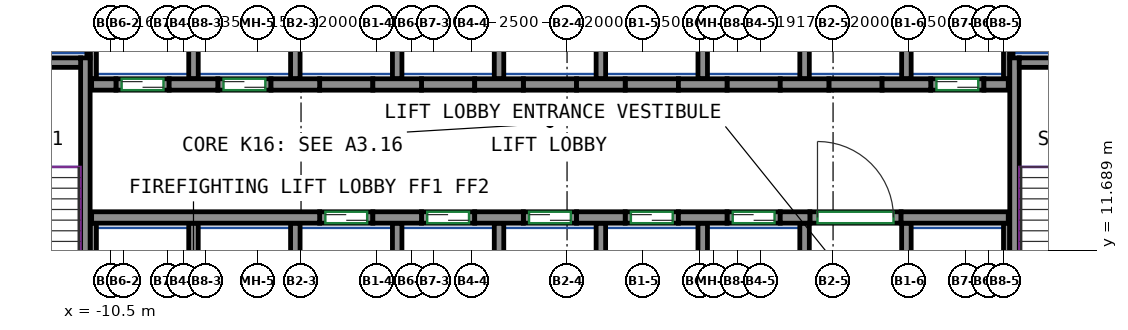
"""IFC4 building model, lengths in metres.
Left out: names, types, materials, properties, quantities, classifications, styles, units other than length and angle.
Written with IfcOpenShell. Run it as: python <this file> out.ifc"""

import sys

from ifc_helpers import new_model, si_unit, direction, frame, frame_2d, origin, place, context, subcontext, project, spatial, rectangle, extrude, source, transform, mapped, element, fill, save


model = new_model("IFC4")
c1 = context("Model", 3, precision=1e-05, world=origin(), true_north=direction((0.0, 1.0)))
c2 = subcontext(c1, "Body", "Model", "MODEL_VIEW")
j1 = project(units=[si_unit("LENGTHUNIT", "METRE"), si_unit("PLANEANGLEUNIT", "RADIAN")], contexts=[c1])
p1 = place(None, origin())
s1 = spatial("IfcSite", under=j1, at=p1, CompositionType="ELEMENT")
p2 = place(p1, origin())
s2 = spatial("IfcBuilding", under=s1, at=p2, CompositionType="ELEMENT")
p3 = place(p2, frame((0.0, 0.0, 67.2)))
s3 = spatial("IfcBuildingStorey", under=s2, at=p3, CompositionType="ELEMENT", Elevation=67.2)
m1 = source(origin(), c2, "Body", "SweptSolid", [
    extrude(rectangle(XDim=7.75, YDim=0.25, at=frame_2d((3.875, 0.0))), origin(), (0.0, 0.0, 1.0), 3.72),
])
p4 = place(p3, frame((-11.175, 9.0, 0.0), z_axis=(0.0, 0.0, 1.0), x_axis=(0.0, 1.0, 0.0)))
e1 = element("IfcWall", 1, at=p4, inside=s3, PredefinedType="SHEAR", context=c2, shape_type="MappedRepresentation", body=[
    mapped(m1, transform((0.0, 0.0, 0.0))),
])
m2 = source(origin(), c2, "Body", "SweptSolid", [
    extrude(rectangle(XDim=3.7, YDim=0.25, at=frame_2d((1.85, 0.0))), origin(), (0.0, 0.0, 1.0), 3.72),
])
p5 = place(p3, frame((-15.0, 16.625, 0.0), z_axis=(0.0, 0.0, 1.0), x_axis=(1.0, 0.0, 0.0)))
e2 = element("IfcWall", 2, at=p5, inside=s3, PredefinedType="SHEAR", context=c2, shape_type="MappedRepresentation", body=[
    mapped(m2, transform((0.0, 0.0, 0.0))),
])
p6 = place(p3, frame((13.275, 9.0, 0.0), z_axis=(0.0, 0.0, 1.0), x_axis=(0.0, 1.0, 0.0)))
e3 = element("IfcWall", 3, at=p6, inside=s3, PredefinedType="SHEAR", context=c2, shape_type="MappedRepresentation", body=[
    mapped(m1, transform((0.0, 0.0, 0.0))),
])
m3 = source(origin(), c2, "Body", "SweptSolid", [
    extrude(rectangle(XDim=3.7, YDim=0.25, at=frame_2d((1.85, 0.0))), origin(), (0.0, 0.0, 1.0), 3.72),
])
p7 = place(p3, frame((13.4, 16.625, 0.0), z_axis=(0.0, 0.0, 1.0), x_axis=(1.0, 0.0, 0.0)))
e4 = element("IfcWall", 4, at=p7, inside=s3, PredefinedType="SHEAR", context=c2, shape_type="MappedRepresentation", body=[
    mapped(m3, transform((0.0, 0.0, 0.0))),
])
m4 = source(origin(), c2, "Body", "SweptSolid", [
    extrude(rectangle(XDim=6.0, YDim=0.3, at=frame_2d((3.0, 0.0))), origin(), (0.0, 0.0, 1.0), 3.72),
])
p8 = place(p3, frame((-11.01, 12.55, 0.0), z_axis=(0.0, 0.0, 1.0), x_axis=(1.0, 0.0, 0.0)))
e5 = element("IfcWall", 5, at=p8, inside=s3, PredefinedType="SHEAR", context=c2, shape_type="MappedRepresentation", body=[
    mapped(m4, transform((0.0, 0.0, 0.0))),
])
m5 = source(origin(), c2, "Body", "SweptSolid", [
    extrude(rectangle(XDim=1.28, YDim=0.3, at=frame_2d((0.64, 0.0))), origin(), (0.0, 0.0, 1.0), 3.72),
])
for number, where, z_axis, x_axis in (
    (6, (-3.61, 12.55, 0.0), (0.0, 0.0, 1.0), (1.0, 0.0, 0.0)),
    (7, (-0.93, 12.55, 0.0), (0.0, 0.0, 1.0), (1.0, 0.0, 0.0)),
    (8, (1.75, 12.55, 0.0), (0.0, 0.0, 1.0), (1.0, 0.0, 0.0)),
    (9, (4.43, 12.55, 0.0), (0.0, 0.0, 1.0), (1.0, 0.0, 0.0)),
):
    element("IfcWall", number, at=place(p3, frame(where, z_axis=z_axis, x_axis=x_axis)), inside=s3, PredefinedType="SHEAR", context=c2, shape_type="MappedRepresentation", body=[
        mapped(m5, transform((0.0, 0.0, 0.0))),
    ])
m6 = source(origin(), c2, "Body", "SweptSolid", [
    extrude(rectangle(XDim=0.78, YDim=0.3, at=frame_2d((0.39, 0.0))), origin(), (0.0, 0.0, 1.0), 3.72),
])
p9 = place(p3, frame((7.11, 12.55, 0.0), z_axis=(0.0, 0.0, 1.0), x_axis=(1.0, 0.0, 0.0)))
e10 = element("IfcWall", 10, at=p9, inside=s3, PredefinedType="SHEAR", context=c2, shape_type="MappedRepresentation", body=[
    mapped(m6, transform((0.0, 0.0, 0.0))),
])
m7 = source(origin(), c2, "Body", "SweptSolid", [
    extrude(rectangle(XDim=2.82, YDim=0.3, at=frame_2d((1.41, 0.0))), origin(), (0.0, 0.0, 1.0), 3.72),
])
p10 = place(p3, frame((10.29, 12.55, 0.0), z_axis=(0.0, 0.0, 1.0), x_axis=(1.0, 0.0, 0.0)))
e11 = element("IfcWall", 11, at=p10, inside=s3, PredefinedType="SHEAR", context=c2, shape_type="MappedRepresentation", body=[
    mapped(m7, transform((0.0, 0.0, 0.0))),
])
m8 = source(origin(), c2, "Body", "SweptSolid", [
    extrude(rectangle(XDim=0.64, YDim=0.3, at=frame_2d((0.32, 0.0))), origin(), (0.0, 0.0, 1.0), 3.72),
])
p11 = place(p3, frame((-11.01, 16.05, 0.0), z_axis=(0.0, 0.0, 1.0), x_axis=(1.0, 0.0, 0.0)))
e12 = element("IfcWall", 12, at=p11, inside=s3, PredefinedType="SHEAR", context=c2, shape_type="MappedRepresentation", body=[
    mapped(m8, transform((0.0, 0.0, 0.0))),
])
for number, where, z_axis, x_axis in (
    (13, (-8.97, 16.05, 0.0), (0.0, 0.0, 1.0), (1.0, 0.0, 0.0)),
    (14, (-6.29, 16.05, 0.0), (0.0, 0.0, 1.0), (1.0, 0.0, 0.0)),
    (15, (-3.61, 16.05, 0.0), (0.0, 0.0, 1.0), (1.0, 0.0, 0.0)),
    (16, (-0.93, 16.05, 0.0), (0.0, 0.0, 1.0), (1.0, 0.0, 0.0)),
    (17, (1.75, 16.05, 0.0), (0.0, 0.0, 1.0), (1.0, 0.0, 0.0)),
    (18, (4.43, 16.05, 0.0), (0.0, 0.0, 1.0), (1.0, 0.0, 0.0)),
):
    element("IfcWall", number, at=place(p3, frame(where, z_axis=z_axis, x_axis=x_axis)), inside=s3, PredefinedType="SHEAR", context=c2, shape_type="MappedRepresentation", body=[
        mapped(m5, transform((0.0, 0.0, 0.0))),
    ])
m9 = source(origin(), c2, "Body", "SweptSolid", [
    extrude(rectangle(XDim=1.28, YDim=0.3, at=frame_2d((0.64, 0.0))), origin(), (0.0, 0.0, 1.0), 3.72),
])
p12 = place(p3, frame((7.11, 16.05, 0.0), z_axis=(0.0, 0.0, 1.0), x_axis=(1.0, 0.0, 0.0)))
e19 = element("IfcWall", 19, at=p12, inside=s3, PredefinedType="SHEAR", context=c2, shape_type="MappedRepresentation", body=[
    mapped(m9, transform((0.0, 0.0, 0.0))),
])
p13 = place(p3, frame((9.79, 16.05, 0.0), z_axis=(0.0, 0.0, 1.0), x_axis=(1.0, 0.0, 0.0)))
e20 = element("IfcWall", 20, at=p13, inside=s3, PredefinedType="SHEAR", context=c2, shape_type="MappedRepresentation", body=[
    mapped(m5, transform((0.0, 0.0, 0.0))),
])
m10 = source(origin(), c2, "Body", "SweptSolid", [
    extrude(rectangle(XDim=0.64, YDim=0.3, at=frame_2d((0.32, 0.0))), origin(), (0.0, 0.0, 1.0), 3.72),
])
p14 = place(p3, frame((12.47, 16.05, 0.0), z_axis=(0.0, 0.0, 1.0), x_axis=(1.0, 0.0, 0.0)))
e21 = element("IfcWall", 21, at=p14, inside=s3, PredefinedType="SHEAR", context=c2, shape_type="MappedRepresentation", body=[
    mapped(m10, transform((0.0, 0.0, 0.0))),
])
m11 = source(origin(), c2, "Body", "SweptSolid", [
    extrude(rectangle(XDim=1.4, YDim=0.3, at=frame_2d((0.7, 0.0))), origin(), (0.0, 0.0, 1.0), 3.72),
])
p15 = place(p3, frame((-5.01, 12.55, 0.0), z_axis=(0.0, 0.0, 1.0), x_axis=(1.0, 0.0, 0.0)))
e22 = element("IfcWall", 22, at=p15, inside=s3, PredefinedType="PARTITIONING", context=c2, shape_type="MappedRepresentation", body=[
    mapped(m11, transform((0.0, 0.0, 0.0))),
])
p16 = place(p15, frame((0.15, 0.0, 0.0)))
e23 = element("IfcOpeningElement", 23, at=p16, cuts=e22, PredefinedType="OPENING", context=c2, shape_type="SweptSolid", body=[
    extrude(rectangle(XDim=1.1, YDim=2.1, at=frame_2d((0.55, 1.05))), frame((0.0, 0.16, 0.0), z_axis=(0.0, -1.0, 0.0), x_axis=(1.0, 0.0, 0.0)), (0.0, 0.0, 1.0), 0.32),
])
m12 = source(origin(), c2, "Body", "SweptSolid", [
    extrude(rectangle(XDim=1.4, YDim=0.3, at=frame_2d((0.7, 0.0))), origin(), (0.0, 0.0, 1.0), 3.72),
])
p17 = place(p3, frame((-2.33, 12.55, 0.0), z_axis=(0.0, 0.0, 1.0), x_axis=(1.0, 0.0, 0.0)))
e24 = element("IfcWall", 24, at=p17, inside=s3, PredefinedType="PARTITIONING", context=c2, shape_type="MappedRepresentation", body=[
    mapped(m12, transform((0.0, 0.0, 0.0))),
])
p18 = place(p17, frame((0.15, 0.0, 0.0)))
e25 = element("IfcOpeningElement", 25, at=p18, cuts=e24, PredefinedType="OPENING", context=c2, shape_type="SweptSolid", body=[
    extrude(rectangle(XDim=1.1, YDim=2.1, at=frame_2d((0.55, 1.05))), frame((0.0, 0.16, 0.0), z_axis=(0.0, -1.0, 0.0), x_axis=(1.0, 0.0, 0.0)), (0.0, 0.0, 1.0), 0.32),
])
p19 = place(p3, frame((0.35, 12.55, 0.0), z_axis=(0.0, 0.0, 1.0), x_axis=(1.0, 0.0, 0.0)))
e26 = element("IfcWall", 26, at=p19, inside=s3, PredefinedType="PARTITIONING", context=c2, shape_type="MappedRepresentation", body=[
    mapped(m11, transform((0.0, 0.0, 0.0))),
])
p20 = place(p19, frame((0.15, 0.0, 0.0)))
e27 = element("IfcOpeningElement", 27, at=p20, cuts=e26, PredefinedType="OPENING", context=c2, shape_type="SweptSolid", body=[
    extrude(rectangle(XDim=1.1, YDim=2.1, at=frame_2d((0.55, 1.05))), frame((0.0, 0.16, 0.0), z_axis=(0.0, -1.0, 0.0), x_axis=(1.0, 0.0, 0.0)), (0.0, 0.0, 1.0), 0.32),
])
p21 = place(p3, frame((3.03, 12.55, 0.0), z_axis=(0.0, 0.0, 1.0), x_axis=(1.0, 0.0, 0.0)))
e28 = element("IfcWall", 28, at=p21, inside=s3, PredefinedType="PARTITIONING", context=c2, shape_type="MappedRepresentation", body=[
    mapped(m11, transform((0.0, 0.0, 0.0))),
])
p22 = place(p21, frame((0.15, 0.0, 0.0)))
e29 = element("IfcOpeningElement", 29, at=p22, cuts=e28, PredefinedType="OPENING", context=c2, shape_type="SweptSolid", body=[
    extrude(rectangle(XDim=1.1, YDim=2.1, at=frame_2d((0.55, 1.05))), frame((0.0, 0.16, 0.0), z_axis=(0.0, -1.0, 0.0), x_axis=(1.0, 0.0, 0.0)), (0.0, 0.0, 1.0), 0.32),
])
p23 = place(p3, frame((5.71, 12.55, 0.0), z_axis=(0.0, 0.0, 1.0), x_axis=(1.0, 0.0, 0.0)))
e30 = element("IfcWall", 30, at=p23, inside=s3, PredefinedType="PARTITIONING", context=c2, shape_type="MappedRepresentation", body=[
    mapped(m12, transform((0.0, 0.0, 0.0))),
])
p24 = place(p23, frame((0.15, 0.0, 0.0)))
e31 = element("IfcOpeningElement", 31, at=p24, cuts=e30, PredefinedType="OPENING", context=c2, shape_type="SweptSolid", body=[
    extrude(rectangle(XDim=1.1, YDim=2.1, at=frame_2d((0.55, 1.05))), frame((0.0, 0.16, 0.0), z_axis=(0.0, -1.0, 0.0), x_axis=(1.0, 0.0, 0.0)), (0.0, 0.0, 1.0), 0.32),
])
p25 = place(p3, frame((11.07, 16.05, 0.0), z_axis=(0.0, 0.0, 1.0), x_axis=(1.0, 0.0, 0.0)))
e32 = element("IfcWall", 32, at=p25, inside=s3, PredefinedType="PARTITIONING", context=c2, shape_type="MappedRepresentation", body=[
    mapped(m11, transform((0.0, 0.0, 0.0))),
])
p26 = place(p25, frame((0.15, 0.0, 0.0)))
e33 = element("IfcOpeningElement", 33, at=p26, cuts=e32, PredefinedType="OPENING", context=c2, shape_type="SweptSolid", body=[
    extrude(rectangle(XDim=1.1, YDim=2.1, at=frame_2d((0.55, 1.05))), frame((0.0, 0.16, 0.0), z_axis=(0.0, -1.0, 0.0), x_axis=(1.0, 0.0, 0.0)), (0.0, 0.0, 1.0), 0.32),
])
p27 = place(p3, frame((-10.37, 16.05, 0.0), z_axis=(0.0, 0.0, 1.0), x_axis=(1.0, 0.0, 0.0)))
e34 = element("IfcWall", 34, at=p27, inside=s3, PredefinedType="PARTITIONING", context=c2, shape_type="MappedRepresentation", body=[
    mapped(m12, transform((0.0, 0.0, 0.0))),
])
p28 = place(p27, frame((0.15, 0.0, 0.0)))
e35 = element("IfcOpeningElement", 35, at=p28, cuts=e34, PredefinedType="OPENING", context=c2, shape_type="SweptSolid", body=[
    extrude(rectangle(XDim=1.1, YDim=2.1, at=frame_2d((0.55, 1.05))), frame((0.0, 0.16, 0.0), z_axis=(0.0, -1.0, 0.0), x_axis=(1.0, 0.0, 0.0)), (0.0, 0.0, 1.0), 0.32),
])
p29 = place(p3, frame((-7.69, 16.05, 0.0), z_axis=(0.0, 0.0, 1.0), x_axis=(1.0, 0.0, 0.0)))
e36 = element("IfcWall", 36, at=p29, inside=s3, PredefinedType="PARTITIONING", context=c2, shape_type="MappedRepresentation", body=[
    mapped(m11, transform((0.0, 0.0, 0.0))),
])
p30 = place(p29, frame((0.15, 0.0, 0.0)))
e37 = element("IfcOpeningElement", 37, at=p30, cuts=e36, PredefinedType="OPENING", context=c2, shape_type="SweptSolid", body=[
    extrude(rectangle(XDim=1.1, YDim=2.1, at=frame_2d((0.55, 1.05))), frame((0.0, 0.16, 0.0), z_axis=(0.0, -1.0, 0.0), x_axis=(1.0, 0.0, 0.0)), (0.0, 0.0, 1.0), 0.32),
])
m13 = source(origin(), c2, "Body", "SweptSolid", [
    extrude(rectangle(XDim=2.4, YDim=0.3, at=frame_2d((1.2, 0.0))), origin(), (0.0, 0.0, 1.0), 3.72),
])
p31 = place(p3, frame((7.89, 12.55, 0.0), z_axis=(0.0, 0.0, 1.0), x_axis=(1.0, 0.0, 0.0)))
e38 = element("IfcWall", 38, at=p31, inside=s3, PredefinedType="PARTITIONING", context=c2, shape_type="MappedRepresentation", body=[
    mapped(m13, transform((0.0, 0.0, 0.0))),
])
p32 = place(p31, frame((0.2, 0.0, 0.0)))
e39 = element("IfcOpeningElement", 39, at=p32, cuts=e38, PredefinedType="OPENING", context=c2, shape_type="SweptSolid", body=[
    extrude(rectangle(XDim=2.0, YDim=2.1, at=frame_2d((1.0, 1.05))), frame((0.0, 0.16, 0.0), z_axis=(0.0, -1.0, 0.0), x_axis=(1.0, 0.0, 0.0)), (0.0, 0.0, 1.0), 0.32),
])
p33 = place(p3, frame((-5.01, 16.05, 0.0), z_axis=(0.0, 0.0, 1.0), x_axis=(1.0, 0.0, 0.0)))
e40 = element("IfcWall", 40, at=p33, inside=s3, PredefinedType="PARTITIONING", context=c2, shape_type="MappedRepresentation", body=[
    mapped(m11, transform((0.0, 0.0, 0.0))),
])
p34 = place(p3, frame((-2.33, 16.05, 0.0), z_axis=(0.0, 0.0, 1.0), x_axis=(1.0, 0.0, 0.0)))
e41 = element("IfcWall", 41, at=p34, inside=s3, PredefinedType="PARTITIONING", context=c2, shape_type="MappedRepresentation", body=[
    mapped(m12, transform((0.0, 0.0, 0.0))),
])
for number, where, z_axis, x_axis in (
    (42, (0.35, 16.05, 0.0), (0.0, 0.0, 1.0), (1.0, 0.0, 0.0)),
    (43, (3.03, 16.05, 0.0), (0.0, 0.0, 1.0), (1.0, 0.0, 0.0)),
):
    element("IfcWall", number, at=place(p3, frame(where, z_axis=z_axis, x_axis=x_axis)), inside=s3, PredefinedType="PARTITIONING", context=c2, shape_type="MappedRepresentation", body=[
        mapped(m11, transform((0.0, 0.0, 0.0))),
    ])
for number, where, z_axis, x_axis in (
    (44, (5.71, 16.05, 0.0), (0.0, 0.0, 1.0), (1.0, 0.0, 0.0)),
    (45, (8.39, 16.05, 0.0), (0.0, 0.0, 1.0), (1.0, 0.0, 0.0)),
):
    element("IfcWall", number, at=place(p3, frame(where, z_axis=z_axis, x_axis=x_axis)), inside=s3, PredefinedType="PARTITIONING", context=c2, shape_type="MappedRepresentation", body=[
        mapped(m12, transform((0.0, 0.0, 0.0))),
    ])
m14 = source(origin(), c2, "Body", "SweptSolid", [
    extrude(rectangle(XDim=3.275, YDim=0.165, at=frame_2d((1.638, 0.0))), origin(), (0.0, 0.0, 1.0), 3.72),
])
for number, where, z_axis, x_axis in (
    (46, (13.067, 16.2, 0.0), (0.0, 0.0, 1.0), (0.0, 1.0, 0.0)),
    (47, (-10.968, 16.2, 0.0), (0.0, 0.0, 1.0), (0.0, 1.0, 0.0)),
):
    element("IfcWall", number, at=place(p3, frame(where, z_axis=z_axis, x_axis=x_axis)), inside=s3, PredefinedType="PARTITIONING", context=c2, shape_type="MappedRepresentation", body=[
        mapped(m14, transform((0.0, 0.0, 0.0))),
    ])
m15 = source(origin(), c2, "Body", "SweptSolid", [
    extrude(rectangle(XDim=3.275, YDim=0.25, at=frame_2d((1.638, 0.0))), origin(), (0.0, 0.0, 1.0), 3.72),
])
p35 = place(p3, frame((10.43, 16.2, 0.0), z_axis=(0.0, 0.0, 1.0), x_axis=(0.0, 1.0, 0.0)))
e48 = element("IfcWall", 48, at=p35, inside=s3, PredefinedType="PARTITIONING", context=c2, shape_type="MappedRepresentation", body=[
    mapped(m15, transform((0.0, 0.0, 0.0))),
])
m16 = source(origin(), c2, "Body", "SweptSolid", [
    extrude(rectangle(XDim=2.725, YDim=0.085, at=frame_2d((1.363, 0.0))), origin(), (0.0, 0.0, 1.0), 3.72),
])
p36 = place(p3, frame((13.192, 16.75, 0.0), z_axis=(0.0, 0.0, 1.0), x_axis=(0.0, 1.0, 0.0)))
e49 = element("IfcWall", 49, at=p36, inside=s3, PredefinedType="PARTITIONING", context=c2, shape_type="MappedRepresentation", body=[
    mapped(m16, transform((0.0, 0.0, 0.0))),
])
for number, where, z_axis, x_axis in (
    (50, (2.39, 16.2, 0.0), (0.0, 0.0, 1.0), (0.0, 1.0, 0.0)),
    (51, (5.07, 16.2, 0.0), (0.0, 0.0, 1.0), (0.0, 1.0, 0.0)),
    (52, (7.75, 16.2, 0.0), (0.0, 0.0, 1.0), (0.0, 1.0, 0.0)),
    (53, (-0.29, 16.2, 0.0), (0.0, 0.0, 1.0), (0.0, 1.0, 0.0)),
):
    element("IfcWall", number, at=place(p3, frame(where, z_axis=z_axis, x_axis=x_axis)), inside=s3, PredefinedType="PARTITIONING", context=c2, shape_type="MappedRepresentation", body=[
        mapped(m15, transform((0.0, 0.0, 0.0))),
    ])
p37 = place(p3, frame((-11.093, 16.75, 0.0), z_axis=(0.0, 0.0, 1.0), x_axis=(0.0, 1.0, 0.0)))
e54 = element("IfcWall", 54, at=p37, inside=s3, PredefinedType="PARTITIONING", context=c2, shape_type="MappedRepresentation", body=[
    mapped(m16, transform((0.0, 0.0, 0.0))),
])
for number, where, z_axis, x_axis in (
    (55, (-2.97, 16.2, 0.0), (0.0, 0.0, 1.0), (0.0, 1.0, 0.0)),
    (56, (-5.65, 16.2, 0.0), (0.0, 0.0, 1.0), (0.0, 1.0, 0.0)),
    (57, (-8.33, 16.2, 0.0), (0.0, 0.0, 1.0), (0.0, 1.0, 0.0)),
):
    element("IfcWall", number, at=place(p3, frame(where, z_axis=z_axis, x_axis=x_axis)), inside=s3, PredefinedType="PARTITIONING", context=c2, shape_type="MappedRepresentation", body=[
        mapped(m15, transform((0.0, 0.0, 0.0))),
    ])
m17 = source(origin(), c2, "Body", "SweptSolid", [
    extrude(rectangle(XDim=3.4, YDim=0.25, at=frame_2d((1.7, 0.0))), origin(), (0.0, 0.0, 1.0), 3.72),
])
p38 = place(p3, frame((10.43, 9.0, 0.0), z_axis=(0.0, 0.0, 1.0), x_axis=(0.0, 1.0, 0.0)))
e58 = element("IfcWall", 58, at=p38, inside=s3, PredefinedType="PARTITIONING", context=c2, shape_type="MappedRepresentation", body=[
    mapped(m17, transform((0.0, 0.0, 0.0))),
])
m18 = source(origin(), c2, "Body", "SweptSolid", [
    extrude(rectangle(XDim=3.4, YDim=0.165, at=frame_2d((1.7, 0.0))), origin(), (0.0, 0.0, 1.0), 3.72),
])
p39 = place(p3, frame((13.067, 9.0, 0.0), z_axis=(0.0, 0.0, 1.0), x_axis=(0.0, 1.0, 0.0)))
e59 = element("IfcWall", 59, at=p39, inside=s3, PredefinedType="PARTITIONING", context=c2, shape_type="MappedRepresentation", body=[
    mapped(m18, transform((0.0, 0.0, 0.0))),
])
for number, where, z_axis, x_axis in (
    (60, (2.39, 9.0, 0.0), (0.0, 0.0, 1.0), (0.0, 1.0, 0.0)),
    (61, (5.07, 9.0, 0.0), (0.0, 0.0, 1.0), (0.0, 1.0, 0.0)),
    (62, (7.75, 9.0, 0.0), (0.0, 0.0, 1.0), (0.0, 1.0, 0.0)),
    (63, (-0.29, 9.0, 0.0), (0.0, 0.0, 1.0), (0.0, 1.0, 0.0)),
):
    element("IfcWall", number, at=place(p3, frame(where, z_axis=z_axis, x_axis=x_axis)), inside=s3, PredefinedType="PARTITIONING", context=c2, shape_type="MappedRepresentation", body=[
        mapped(m17, transform((0.0, 0.0, 0.0))),
    ])
p40 = place(p3, frame((-10.968, 9.0, 0.0), z_axis=(0.0, 0.0, 1.0), x_axis=(0.0, 1.0, 0.0)))
e64 = element("IfcWall", 64, at=p40, inside=s3, PredefinedType="PARTITIONING", context=c2, shape_type="MappedRepresentation", body=[
    mapped(m18, transform((0.0, 0.0, 0.0))),
])
for number, where, z_axis, x_axis in (
    (65, (-2.97, 9.0, 0.0), (0.0, 0.0, 1.0), (0.0, 1.0, 0.0)),
    (66, (-5.65, 9.0, 0.0), (0.0, 0.0, 1.0), (0.0, 1.0, 0.0)),
    (67, (-8.33, 9.0, 0.0), (0.0, 0.0, 1.0), (0.0, 1.0, 0.0)),
):
    element("IfcWall", number, at=place(p3, frame(where, z_axis=z_axis, x_axis=x_axis)), inside=s3, PredefinedType="PARTITIONING", context=c2, shape_type="MappedRepresentation", body=[
        mapped(m17, transform((0.0, 0.0, 0.0))),
    ])
p41 = place(p32, origin())
e68 = element("IfcDoor", 68, at=p41, inside=s3, OperationType="DOUBLE_DOOR_SINGLE_SWING", PredefinedType="DOOR", context=c2, shape_type="SweptSolid", body=[
    extrude(rectangle(XDim=2.0, YDim=2.1, at=frame_2d((1.0, 1.05))), frame((0.0, 0.025, 0.0), z_axis=(0.0, -1.0, 0.0), x_axis=(1.0, 0.0, 0.0)), (0.0, 0.0, 1.0), 0.05),
])
fill(e39, e68)
p42 = place(p16, origin())
e69 = element("IfcDoor", 69, at=p42, inside=s3, OperationType="DOUBLE_DOOR_SLIDING", PredefinedType="DOOR", context=c2, shape_type="SweptSolid", body=[
    extrude(rectangle(XDim=1.1, YDim=2.1, at=frame_2d((0.55, 1.05))), frame((0.0, 0.025, 0.0), z_axis=(0.0, -1.0, 0.0), x_axis=(1.0, 0.0, 0.0)), (0.0, 0.0, 1.0), 0.05),
])
fill(e23, e69)
p43 = place(p18, origin())
e70 = element("IfcDoor", 70, at=p43, inside=s3, OperationType="DOUBLE_DOOR_SLIDING", PredefinedType="DOOR", context=c2, shape_type="SweptSolid", body=[
    extrude(rectangle(XDim=1.1, YDim=2.1, at=frame_2d((0.55, 1.05))), frame((0.0, 0.025, 0.0), z_axis=(0.0, -1.0, 0.0), x_axis=(1.0, 0.0, 0.0)), (0.0, 0.0, 1.0), 0.05),
])
fill(e25, e70)
p44 = place(p20, origin())
e71 = element("IfcDoor", 71, at=p44, inside=s3, OperationType="DOUBLE_DOOR_SLIDING", PredefinedType="DOOR", context=c2, shape_type="SweptSolid", body=[
    extrude(rectangle(XDim=1.1, YDim=2.1, at=frame_2d((0.55, 1.05))), frame((0.0, 0.025, 0.0), z_axis=(0.0, -1.0, 0.0), x_axis=(1.0, 0.0, 0.0)), (0.0, 0.0, 1.0), 0.05),
])
fill(e27, e71)
p45 = place(p22, origin())
e72 = element("IfcDoor", 72, at=p45, inside=s3, OperationType="DOUBLE_DOOR_SLIDING", PredefinedType="DOOR", context=c2, shape_type="SweptSolid", body=[
    extrude(rectangle(XDim=1.1, YDim=2.1, at=frame_2d((0.55, 1.05))), frame((0.0, 0.025, 0.0), z_axis=(0.0, -1.0, 0.0), x_axis=(1.0, 0.0, 0.0)), (0.0, 0.0, 1.0), 0.05),
])
fill(e29, e72)
p46 = place(p24, origin())
e73 = element("IfcDoor", 73, at=p46, inside=s3, OperationType="DOUBLE_DOOR_SLIDING", PredefinedType="DOOR", context=c2, shape_type="SweptSolid", body=[
    extrude(rectangle(XDim=1.1, YDim=2.1, at=frame_2d((0.55, 1.05))), frame((0.0, 0.025, 0.0), z_axis=(0.0, -1.0, 0.0), x_axis=(1.0, 0.0, 0.0)), (0.0, 0.0, 1.0), 0.05),
])
fill(e31, e73)
p47 = place(p26, origin())
e74 = element("IfcDoor", 74, at=p47, inside=s3, OperationType="DOUBLE_DOOR_SLIDING", PredefinedType="DOOR", context=c2, shape_type="SweptSolid", body=[
    extrude(rectangle(XDim=1.1, YDim=2.1, at=frame_2d((0.55, 1.05))), frame((0.0, 0.025, 0.0), z_axis=(0.0, -1.0, 0.0), x_axis=(1.0, 0.0, 0.0)), (0.0, 0.0, 1.0), 0.05),
])
fill(e33, e74)
p48 = place(p28, origin())
e75 = element("IfcDoor", 75, at=p48, inside=s3, OperationType="DOUBLE_DOOR_SLIDING", PredefinedType="DOOR", context=c2, shape_type="SweptSolid", body=[
    extrude(rectangle(XDim=1.1, YDim=2.1, at=frame_2d((0.55, 1.05))), frame((0.0, 0.025, 0.0), z_axis=(0.0, -1.0, 0.0), x_axis=(1.0, 0.0, 0.0)), (0.0, 0.0, 1.0), 0.05),
])
fill(e35, e75)
p49 = place(p30, origin())
e76 = element("IfcDoor", 76, at=p49, inside=s3, OperationType="DOUBLE_DOOR_SLIDING", PredefinedType="DOOR", context=c2, shape_type="SweptSolid", body=[
    extrude(rectangle(XDim=1.1, YDim=2.1, at=frame_2d((0.55, 1.05))), frame((0.0, 0.025, 0.0), z_axis=(0.0, -1.0, 0.0), x_axis=(1.0, 0.0, 0.0)), (0.0, 0.0, 1.0), 0.05),
])
fill(e37, e76)
save(model, sys.argv[1])
